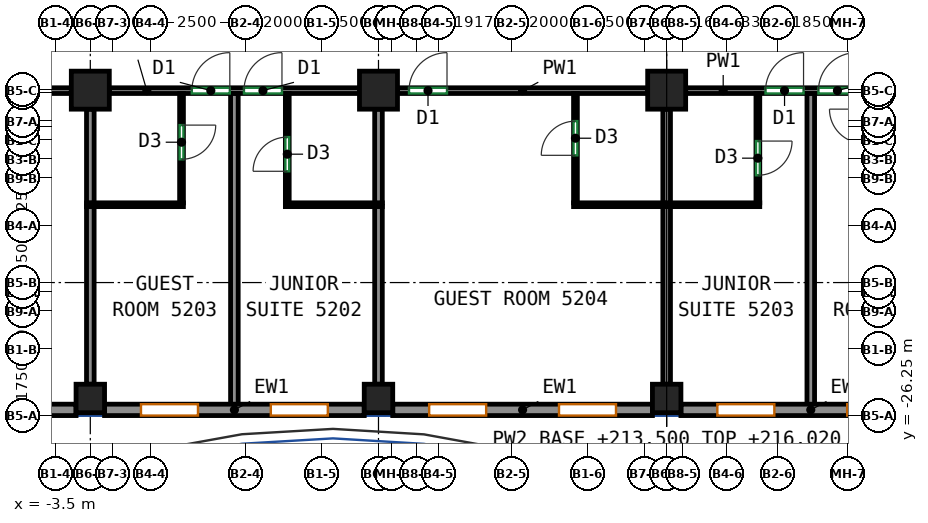
"""IFC4 building model, lengths in metres.
Left out: names, types, materials, properties, quantities, classifications, styles, units other than length and angle.
Written with IfcOpenShell. Run it as: python <this file> out.ifc"""

import sys

from ifc_helpers import new_model, si_unit, direction, frame, frame_2d, origin, origin_2d, place, context, subcontext, project, spatial, rectangle, extrude, source, transform, mapped, element, fill, save


model = new_model("IFC4")
c1 = context("Model", 3, precision=1e-05, world=origin(), true_north=direction((0.0, 1.0)))
c2 = subcontext(c1, "Body", "Model", "MODEL_VIEW")
j1 = project(units=[si_unit("LENGTHUNIT", "METRE"), si_unit("PLANEANGLEUNIT", "RADIAN")], contexts=[c1])
p1 = place(None, origin())
s1 = spatial("IfcSite", under=j1, at=p1, CompositionType="ELEMENT")
p2 = place(p1, origin())
s2 = spatial("IfcBuilding", under=s1, at=p2, CompositionType="ELEMENT")
p3 = place(p2, frame((0.0, 0.0, 213.5)))
s3 = spatial("IfcBuildingStorey", under=s2, at=p3, CompositionType="ELEMENT", Elevation=213.5)
m1 = source(origin(), c2, "Body", "SweptSolid", [
    extrude(rectangle(XDim=0.75, YDim=0.75, at=origin_2d()), origin(), (0.0, 0.0, 1.0), 3.12),
])
p4 = place(p3, frame((-2.583, -25.8, 0.0), z_axis=(0.0, 0.0, 1.0), x_axis=(1.0, 0.0, 0.0)))
e1 = element("IfcColumn", 1, at=p4, inside=s3, PredefinedType="COLUMN", context=c2, shape_type="MappedRepresentation", body=[
    mapped(m1, transform((0.0, 0.0, 0.0))),
])
m2 = source(origin(), c2, "Body", "SweptSolid", [
    extrude(rectangle(XDim=1.0, YDim=1.0, at=origin_2d()), origin(), (0.0, 0.0, 1.0), 3.12),
])
p5 = place(p3, frame((-2.583, -17.688, 0.0), z_axis=(0.0, 0.0, 1.0), x_axis=(1.0, 0.0, 0.0)))
e2 = element("IfcColumn", 2, at=p5, inside=s3, PredefinedType="COLUMN", context=c2, shape_type="MappedRepresentation", body=[
    mapped(m2, transform((0.0, 0.0, 0.0))),
])
p6 = place(p3, frame((5.0, -25.8, 0.0), z_axis=(0.0, 0.0, 1.0), x_axis=(1.0, 0.0, 0.0)))
e3 = element("IfcColumn", 3, at=p6, inside=s3, PredefinedType="COLUMN", context=c2, shape_type="MappedRepresentation", body=[
    mapped(m1, transform((0.0, 0.0, 0.0))),
])
p7 = place(p3, frame((5.0, -17.688, 0.0), z_axis=(0.0, 0.0, 1.0), x_axis=(1.0, 0.0, 0.0)))
e4 = element("IfcColumn", 4, at=p7, inside=s3, PredefinedType="COLUMN", context=c2, shape_type="MappedRepresentation", body=[
    mapped(m2, transform((0.0, 0.0, 0.0))),
])
p8 = place(p3, frame((12.583, -25.8, 0.0), z_axis=(0.0, 0.0, 1.0), x_axis=(1.0, 0.0, 0.0)))
e5 = element("IfcColumn", 5, at=p8, inside=s3, PredefinedType="COLUMN", context=c2, shape_type="MappedRepresentation", body=[
    mapped(m1, transform((0.0, 0.0, 0.0))),
])
p9 = place(p3, frame((12.583, -17.688, 0.0), z_axis=(0.0, 0.0, 1.0), x_axis=(1.0, 0.0, 0.0)))
e6 = element("IfcColumn", 6, at=p9, inside=s3, PredefinedType="COLUMN", context=c2, shape_type="MappedRepresentation", body=[
    mapped(m2, transform((0.0, 0.0, 0.0))),
])
m3 = source(origin(), c2, "Body", "SweptSolid", [
    extrude(rectangle(XDim=6.833, YDim=0.3, at=frame_2d((3.417, 0.0))), origin(), (0.0, 0.0, 1.0), 3.12),
])
p10 = place(p3, frame((-9.792, -26.1, 0.0), z_axis=(0.0, 0.0, 1.0), x_axis=(1.0, 0.0, 0.0)))
e7 = element("IfcWall", 7, at=p10, inside=s3, PredefinedType="SOLIDWALL", context=c2, shape_type="MappedRepresentation", body=[
    mapped(m3, transform((0.0, 0.0, 0.0))),
])
p11 = place(p10, frame((0.958, 0.0, 0.85)))
e8 = element("IfcOpeningElement", 8, at=p11, cuts=e7, PredefinedType="OPENING", context=c2, shape_type="SweptSolid", body=[
    extrude(rectangle(XDim=1.5, YDim=1.95, at=frame_2d((0.75, 0.975))), frame((0.0, 0.16, 0.0), z_axis=(0.0, -1.0, 0.0), x_axis=(1.0, 0.0, 0.0)), (0.0, 0.0, 1.0), 0.32),
])
p12 = place(p10, frame((4.375, 0.0, 0.85)))
e9 = element("IfcOpeningElement", 9, at=p12, cuts=e7, PredefinedType="OPENING", context=c2, shape_type="SweptSolid", body=[
    extrude(rectangle(XDim=1.5, YDim=1.95, at=frame_2d((0.75, 0.975))), frame((0.0, 0.16, 0.0), z_axis=(0.0, -1.0, 0.0), x_axis=(1.0, 0.0, 0.0)), (0.0, 0.0, 1.0), 0.32),
])
m4 = source(origin(), c2, "Body", "SweptSolid", [
    extrude(rectangle(XDim=6.833, YDim=0.3, at=frame_2d((3.417, 0.0))), origin(), (0.0, 0.0, 1.0), 3.12),
])
p13 = place(p3, frame((-2.208, -26.1, 0.0), z_axis=(0.0, 0.0, 1.0), x_axis=(1.0, 0.0, 0.0)))
e10 = element("IfcWall", 10, at=p13, inside=s3, PredefinedType="SOLIDWALL", context=c2, shape_type="MappedRepresentation", body=[
    mapped(m4, transform((0.0, 0.0, 0.0))),
])
p14 = place(p13, frame((0.958, 0.0, 0.85)))
e11 = element("IfcOpeningElement", 11, at=p14, cuts=e10, PredefinedType="OPENING", context=c2, shape_type="SweptSolid", body=[
    extrude(rectangle(XDim=1.5, YDim=1.95, at=frame_2d((0.75, 0.975))), frame((0.0, 0.16, 0.0), z_axis=(0.0, -1.0, 0.0), x_axis=(1.0, 0.0, 0.0)), (0.0, 0.0, 1.0), 0.32),
])
p15 = place(p13, frame((4.375, 0.0, 0.85)))
e12 = element("IfcOpeningElement", 12, at=p15, cuts=e10, PredefinedType="OPENING", context=c2, shape_type="SweptSolid", body=[
    extrude(rectangle(XDim=1.5, YDim=1.95, at=frame_2d((0.75, 0.975))), frame((0.0, 0.16, 0.0), z_axis=(0.0, -1.0, 0.0), x_axis=(1.0, 0.0, 0.0)), (0.0, 0.0, 1.0), 0.32),
])
p16 = place(p3, frame((5.375, -26.1, 0.0), z_axis=(0.0, 0.0, 1.0), x_axis=(1.0, 0.0, 0.0)))
e13 = element("IfcWall", 13, at=p16, inside=s3, PredefinedType="SOLIDWALL", context=c2, shape_type="MappedRepresentation", body=[
    mapped(m4, transform((0.0, 0.0, 0.0))),
])
p17 = place(p16, frame((0.958, 0.0, 0.85)))
e14 = element("IfcOpeningElement", 14, at=p17, cuts=e13, PredefinedType="OPENING", context=c2, shape_type="SweptSolid", body=[
    extrude(rectangle(XDim=1.5, YDim=1.95, at=frame_2d((0.75, 0.975))), frame((0.0, 0.16, 0.0), z_axis=(0.0, -1.0, 0.0), x_axis=(1.0, 0.0, 0.0)), (0.0, 0.0, 1.0), 0.32),
])
p18 = place(p16, frame((4.375, 0.0, 0.85)))
e15 = element("IfcOpeningElement", 15, at=p18, cuts=e13, PredefinedType="OPENING", context=c2, shape_type="SweptSolid", body=[
    extrude(rectangle(XDim=1.5, YDim=1.95, at=frame_2d((0.75, 0.975))), frame((0.0, 0.16, 0.0), z_axis=(0.0, -1.0, 0.0), x_axis=(1.0, 0.0, 0.0)), (0.0, 0.0, 1.0), 0.32),
])
p19 = place(p3, frame((12.958, -26.1, 0.0), z_axis=(0.0, 0.0, 1.0), x_axis=(1.0, 0.0, 0.0)))
e16 = element("IfcWall", 16, at=p19, inside=s3, PredefinedType="SOLIDWALL", context=c2, shape_type="MappedRepresentation", body=[
    mapped(m3, transform((0.0, 0.0, 0.0))),
])
p20 = place(p19, frame((0.958, 0.0, 0.85)))
e17 = element("IfcOpeningElement", 17, at=p20, cuts=e16, PredefinedType="OPENING", context=c2, shape_type="SweptSolid", body=[
    extrude(rectangle(XDim=1.5, YDim=1.95, at=frame_2d((0.75, 0.975))), frame((0.0, 0.16, 0.0), z_axis=(0.0, -1.0, 0.0), x_axis=(1.0, 0.0, 0.0)), (0.0, 0.0, 1.0), 0.32),
])
p21 = place(p19, frame((4.375, 0.0, 0.85)))
e18 = element("IfcOpeningElement", 18, at=p21, cuts=e16, PredefinedType="OPENING", context=c2, shape_type="SweptSolid", body=[
    extrude(rectangle(XDim=1.5, YDim=1.95, at=frame_2d((0.75, 0.975))), frame((0.0, 0.16, 0.0), z_axis=(0.0, -1.0, 0.0), x_axis=(1.0, 0.0, 0.0)), (0.0, 0.0, 1.0), 0.32),
])
p22 = place(p3, frame((-9.667, -17.7, 0.0), z_axis=(0.0, 0.0, 1.0), x_axis=(1.0, 0.0, 0.0)))
e19 = element("IfcWall", 19, at=p22, inside=s3, PredefinedType="PARTITIONING", context=c2, shape_type="SweptSolid", body=[
    extrude(rectangle(XDim=6.584, YDim=0.15, at=frame_2d((3.292, 0.0))), origin(), (0.0, 0.0, 1.0), 3.12),
])
p23 = place(p22, frame((3.119, 0.0, 0.0)))
e20 = element("IfcOpeningElement", 20, at=p23, cuts=e19, PredefinedType="OPENING", context=c2, shape_type="SweptSolid", body=[
    extrude(rectangle(XDim=1.0, YDim=2.1, at=frame_2d((0.5, 1.05))), frame((0.0, 0.085, 0.0), z_axis=(0.0, -1.0, 0.0), x_axis=(1.0, 0.0, 0.0)), (0.0, 0.0, 1.0), 0.17),
])
p24 = place(p3, frame((-2.083, -17.7, 0.0), z_axis=(0.0, 0.0, 1.0), x_axis=(1.0, 0.0, 0.0)))
e21 = element("IfcWall", 21, at=p24, inside=s3, PredefinedType="PARTITIONING", context=c2, shape_type="SweptSolid", body=[
    extrude(rectangle(XDim=6.583, YDim=0.15, at=frame_2d((3.292, 0.0))), origin(), (0.0, 0.0, 1.0), 3.12),
])
p25 = place(p24, frame((2.171, 0.0, 0.0)))
e22 = element("IfcOpeningElement", 22, at=p25, cuts=e21, PredefinedType="OPENING", context=c2, shape_type="SweptSolid", body=[
    extrude(rectangle(XDim=1.0, YDim=2.1, at=frame_2d((0.5, 1.05))), frame((0.0, 0.085, 0.0), z_axis=(0.0, -1.0, 0.0), x_axis=(1.0, 0.0, 0.0)), (0.0, 0.0, 1.0), 0.17),
])
p26 = place(p24, frame((3.543, 0.0, 0.0)))
e23 = element("IfcOpeningElement", 23, at=p26, cuts=e21, PredefinedType="OPENING", context=c2, shape_type="SweptSolid", body=[
    extrude(rectangle(XDim=1.0, YDim=2.1, at=frame_2d((0.5, 1.05))), frame((0.0, 0.085, 0.0), z_axis=(0.0, -1.0, 0.0), x_axis=(1.0, 0.0, 0.0)), (0.0, 0.0, 1.0), 0.17),
])
p27 = place(p3, frame((5.5, -17.7, 0.0), z_axis=(0.0, 0.0, 1.0), x_axis=(1.0, 0.0, 0.0)))
e24 = element("IfcWall", 24, at=p27, inside=s3, PredefinedType="PARTITIONING", context=c2, shape_type="SweptSolid", body=[
    extrude(rectangle(XDim=6.583, YDim=0.15, at=frame_2d((3.292, 0.0))), origin(), (0.0, 0.0, 1.0), 3.12),
])
p28 = place(p27, frame((0.303, 0.0, 0.0)))
e25 = element("IfcOpeningElement", 25, at=p28, cuts=e24, PredefinedType="OPENING", context=c2, shape_type="SweptSolid", body=[
    extrude(rectangle(XDim=1.0, YDim=2.1, at=frame_2d((0.5, 1.05))), frame((0.0, 0.085, 0.0), z_axis=(0.0, -1.0, 0.0), x_axis=(1.0, 0.0, 0.0)), (0.0, 0.0, 1.0), 0.17),
])
p29 = place(p3, frame((13.083, -17.7, 0.0), z_axis=(0.0, 0.0, 1.0), x_axis=(1.0, 0.0, 0.0)))
e26 = element("IfcWall", 26, at=p29, inside=s3, PredefinedType="PARTITIONING", context=c2, shape_type="SweptSolid", body=[
    extrude(rectangle(XDim=6.584, YDim=0.15, at=frame_2d((3.292, 0.0))), origin(), (0.0, 0.0, 1.0), 3.12),
])
p30 = place(p29, frame((2.102, 0.0, 0.0)))
e27 = element("IfcOpeningElement", 27, at=p30, cuts=e26, PredefinedType="OPENING", context=c2, shape_type="SweptSolid", body=[
    extrude(rectangle(XDim=1.0, YDim=2.1, at=frame_2d((0.5, 1.05))), frame((0.0, 0.085, 0.0), z_axis=(0.0, -1.0, 0.0), x_axis=(1.0, 0.0, 0.0)), (0.0, 0.0, 1.0), 0.17),
])
p31 = place(p29, frame((3.494, 0.0, 0.0)))
e28 = element("IfcOpeningElement", 28, at=p31, cuts=e26, PredefinedType="OPENING", context=c2, shape_type="SweptSolid", body=[
    extrude(rectangle(XDim=1.0, YDim=2.1, at=frame_2d((0.5, 1.05))), frame((0.0, 0.085, 0.0), z_axis=(0.0, -1.0, 0.0), x_axis=(1.0, 0.0, 0.0)), (0.0, 0.0, 1.0), 0.17),
])
p32 = place(p3, frame((-2.583, -25.425, 0.0), z_axis=(0.0, 0.0, 1.0), x_axis=(0.0, 1.0, 0.0)))
e29 = element("IfcWall", 29, at=p32, inside=s3, PredefinedType="PARTITIONING", context=c2, shape_type="SweptSolid", body=[
    extrude(rectangle(XDim=4.683, YDim=0.2, at=frame_2d((2.342, 0.0))), origin(), (0.0, 0.0, 1.0), 3.12),
])
p33 = place(p3, frame((-2.583, -20.662, 0.0), z_axis=(0.0, 0.0, 1.0), x_axis=(0.0, 1.0, 0.0)))
e30 = element("IfcWall", 30, at=p33, inside=s3, PredefinedType="PARTITIONING", context=c2, shape_type="SweptSolid", body=[
    extrude(rectangle(XDim=2.474, YDim=0.2, at=frame_2d((1.237, 0.0))), origin(), (0.0, 0.0, 1.0), 3.12),
])
p34 = place(p3, frame((-0.183, -17.777, 0.0), z_axis=(0.0, 0.0, 1.0), x_axis=(0.0, -1.0, 0.0)))
e31 = element("IfcWall", 31, at=p34, inside=s3, PredefinedType="PARTITIONING", context=c2, shape_type="SweptSolid", body=[
    extrude(rectangle(XDim=2.875, YDim=0.1, at=frame_2d((1.438, 0.0))), origin(), (0.0, 0.0, 1.0), 3.12),
])
p35 = place(p34, frame((0.83, 0.0, 0.0)))
e32 = element("IfcOpeningElement", 32, at=p35, cuts=e31, PredefinedType="OPENING", context=c2, shape_type="SweptSolid", body=[
    extrude(rectangle(XDim=0.9, YDim=2.1, at=frame_2d((0.45, 1.05))), frame((0.0, 0.06, 0.0), z_axis=(0.0, -1.0, 0.0), x_axis=(1.0, 0.0, 0.0)), (0.0, 0.0, 1.0), 0.12),
])
p36 = place(p3, frame((-2.683, -20.702, 0.0), z_axis=(0.0, 0.0, 1.0), x_axis=(1.0, 0.0, 0.0)))
e33 = element("IfcWall", 33, at=p36, inside=s3, PredefinedType="PARTITIONING", context=c2, shape_type="SweptSolid", body=[
    extrude(rectangle(XDim=2.55, YDim=0.1, at=frame_2d((1.275, 0.0))), origin(), (0.0, 0.0, 1.0), 3.12),
])
p37 = place(p3, frame((1.208, -26.0, 0.0), z_axis=(0.0, 0.0, 1.0), x_axis=(0.0, 1.0, 0.0)))
e34 = element("IfcWall", 34, at=p37, inside=s3, PredefinedType="PARTITIONING", context=c2, shape_type="SweptSolid", body=[
    extrude(rectangle(XDim=8.223, YDim=0.2, at=frame_2d((4.111, 0.0))), origin(), (0.0, 0.0, 1.0), 3.12),
])
p38 = place(p3, frame((2.6, -20.652, 0.0), z_axis=(0.0, 0.0, 1.0), x_axis=(0.0, 1.0, 0.0)))
e35 = element("IfcWall", 35, at=p38, inside=s3, PredefinedType="PARTITIONING", context=c2, shape_type="SweptSolid", body=[
    extrude(rectangle(XDim=2.875, YDim=0.1, at=frame_2d((1.438, 0.0))), origin(), (0.0, 0.0, 1.0), 3.12),
])
p39 = place(p38, frame((0.83, 0.0, 0.0)))
e36 = element("IfcOpeningElement", 36, at=p39, cuts=e35, PredefinedType="OPENING", context=c2, shape_type="SweptSolid", body=[
    extrude(rectangle(XDim=0.9, YDim=2.1, at=frame_2d((0.45, 1.05))), frame((0.0, 0.06, 0.0), z_axis=(0.0, -1.0, 0.0), x_axis=(1.0, 0.0, 0.0)), (0.0, 0.0, 1.0), 0.12),
])
p40 = place(p3, frame((2.55, -20.702, 0.0), z_axis=(0.0, 0.0, 1.0), x_axis=(1.0, 0.0, 0.0)))
e37 = element("IfcWall", 37, at=p40, inside=s3, PredefinedType="PARTITIONING", context=c2, shape_type="SweptSolid", body=[
    extrude(rectangle(XDim=2.55, YDim=0.1, at=frame_2d((1.275, 0.0))), origin(), (0.0, 0.0, 1.0), 3.12),
])
p41 = place(p3, frame((5.0, -25.425, 0.0), z_axis=(0.0, 0.0, 1.0), x_axis=(0.0, 1.0, 0.0)))
e38 = element("IfcWall", 38, at=p41, inside=s3, PredefinedType="PARTITIONING", context=c2, shape_type="SweptSolid", body=[
    extrude(rectangle(XDim=4.673, YDim=0.2, at=frame_2d((2.336, 0.0))), origin(), (0.0, 0.0, 1.0), 3.12),
])
p42 = place(p3, frame((5.0, -20.652, 0.0), z_axis=(0.0, 0.0, 1.0), x_axis=(0.0, 1.0, 0.0)))
e39 = element("IfcWall", 39, at=p42, inside=s3, PredefinedType="PARTITIONING", context=c2, shape_type="SweptSolid", body=[
    extrude(rectangle(XDim=2.464, YDim=0.2, at=frame_2d((1.232, 0.0))), origin(), (0.0, 0.0, 1.0), 3.12),
])
p43 = place(p3, frame((10.183, -20.652, 0.0), z_axis=(0.0, 0.0, 1.0), x_axis=(0.0, 1.0, 0.0)))
e40 = element("IfcWall", 40, at=p43, inside=s3, PredefinedType="PARTITIONING", context=c2, shape_type="SweptSolid", body=[
    extrude(rectangle(XDim=2.875, YDim=0.1, at=frame_2d((1.438, 0.0))), origin(), (0.0, 0.0, 1.0), 3.12),
])
p44 = place(p43, frame((1.25, 0.0, 0.0)))
e41 = element("IfcOpeningElement", 41, at=p44, cuts=e40, PredefinedType="OPENING", context=c2, shape_type="SweptSolid", body=[
    extrude(rectangle(XDim=0.9, YDim=2.1, at=frame_2d((0.45, 1.05))), frame((0.0, 0.06, 0.0), z_axis=(0.0, -1.0, 0.0), x_axis=(1.0, 0.0, 0.0)), (0.0, 0.0, 1.0), 0.12),
])
p45 = place(p3, frame((10.133, -20.702, 0.0), z_axis=(0.0, 0.0, 1.0), x_axis=(1.0, 0.0, 0.0)))
e42 = element("IfcWall", 42, at=p45, inside=s3, PredefinedType="PARTITIONING", context=c2, shape_type="SweptSolid", body=[
    extrude(rectangle(XDim=4.9, YDim=0.1, at=frame_2d((2.45, 0.0))), origin(), (0.0, 0.0, 1.0), 3.12),
])
p46 = place(p3, frame((12.583, -25.425, 0.0), z_axis=(0.0, 0.0, 1.0), x_axis=(0.0, 1.0, 0.0)))
e43 = element("IfcWall", 43, at=p46, inside=s3, PredefinedType="PARTITIONING", context=c2, shape_type="SweptSolid", body=[
    extrude(rectangle(XDim=4.673, YDim=0.2, at=frame_2d((2.336, 0.0))), origin(), (0.0, 0.0, 1.0), 3.12),
])
p47 = place(p3, frame((12.583, -20.652, 0.0), z_axis=(0.0, 0.0, 1.0), x_axis=(0.0, 1.0, 0.0)))
e44 = element("IfcWall", 44, at=p47, inside=s3, PredefinedType="PARTITIONING", context=c2, shape_type="SweptSolid", body=[
    extrude(rectangle(XDim=2.464, YDim=0.2, at=frame_2d((1.232, 0.0))), origin(), (0.0, 0.0, 1.0), 3.12),
])
p48 = place(p3, frame((14.983, -17.777, 0.0), z_axis=(0.0, 0.0, 1.0), x_axis=(0.0, -1.0, 0.0)))
e45 = element("IfcWall", 45, at=p48, inside=s3, PredefinedType="PARTITIONING", context=c2, shape_type="SweptSolid", body=[
    extrude(rectangle(XDim=2.875, YDim=0.1, at=frame_2d((1.438, 0.0))), origin(), (0.0, 0.0, 1.0), 3.12),
])
p49 = place(p48, frame((1.25, 0.0, 0.0)))
e46 = element("IfcOpeningElement", 46, at=p49, cuts=e45, PredefinedType="OPENING", context=c2, shape_type="SweptSolid", body=[
    extrude(rectangle(XDim=0.9, YDim=2.1, at=frame_2d((0.45, 1.05))), frame((0.0, 0.06, 0.0), z_axis=(0.0, -1.0, 0.0), x_axis=(1.0, 0.0, 0.0)), (0.0, 0.0, 1.0), 0.12),
])
p50 = place(p3, frame((16.375, -26.0, 0.0), z_axis=(0.0, 0.0, 1.0), x_axis=(0.0, 1.0, 0.0)))
e47 = element("IfcWall", 47, at=p50, inside=s3, PredefinedType="PARTITIONING", context=c2, shape_type="SweptSolid", body=[
    extrude(rectangle(XDim=8.223, YDim=0.2, at=frame_2d((4.111, 0.0))), origin(), (0.0, 0.0, 1.0), 3.12),
])
p51 = place(p14, origin())
e48 = element("IfcWindow", 48, at=p51, inside=s3, PartitioningType="SINGLE_PANEL", PredefinedType="WINDOW", context=c2, shape_type="SweptSolid", body=[
    extrude(rectangle(XDim=1.5, YDim=1.95, at=frame_2d((0.75, 0.975))), frame((0.0, 0.03, 0.0), z_axis=(0.0, -1.0, 0.0), x_axis=(1.0, 0.0, 0.0)), (0.0, 0.0, 1.0), 0.06),
])
fill(e11, e48)
p52 = place(p15, origin())
e49 = element("IfcWindow", 49, at=p52, inside=s3, PartitioningType="SINGLE_PANEL", PredefinedType="WINDOW", context=c2, shape_type="SweptSolid", body=[
    extrude(rectangle(XDim=1.5, YDim=1.95, at=frame_2d((0.75, 0.975))), frame((0.0, 0.03, 0.0), z_axis=(0.0, -1.0, 0.0), x_axis=(1.0, 0.0, 0.0)), (0.0, 0.0, 1.0), 0.06),
])
fill(e12, e49)
p53 = place(p17, origin())
e50 = element("IfcWindow", 50, at=p53, inside=s3, PartitioningType="SINGLE_PANEL", PredefinedType="WINDOW", context=c2, shape_type="SweptSolid", body=[
    extrude(rectangle(XDim=1.5, YDim=1.95, at=frame_2d((0.75, 0.975))), frame((0.0, 0.03, 0.0), z_axis=(0.0, -1.0, 0.0), x_axis=(1.0, 0.0, 0.0)), (0.0, 0.0, 1.0), 0.06),
])
fill(e14, e50)
p54 = place(p18, origin())
e51 = element("IfcWindow", 51, at=p54, inside=s3, PartitioningType="SINGLE_PANEL", PredefinedType="WINDOW", context=c2, shape_type="SweptSolid", body=[
    extrude(rectangle(XDim=1.5, YDim=1.95, at=frame_2d((0.75, 0.975))), frame((0.0, 0.03, 0.0), z_axis=(0.0, -1.0, 0.0), x_axis=(1.0, 0.0, 0.0)), (0.0, 0.0, 1.0), 0.06),
])
fill(e15, e51)
p55 = place(p20, origin())
e52 = element("IfcWindow", 52, at=p55, inside=s3, PartitioningType="SINGLE_PANEL", PredefinedType="WINDOW", context=c2, shape_type="SweptSolid", body=[
    extrude(rectangle(XDim=1.5, YDim=1.95, at=frame_2d((0.75, 0.975))), frame((0.0, 0.03, 0.0), z_axis=(0.0, -1.0, 0.0), x_axis=(1.0, 0.0, 0.0)), (0.0, 0.0, 1.0), 0.06),
])
fill(e17, e52)
p56 = place(p21, origin())
e53 = element("IfcWindow", 53, at=p56, inside=s3, PartitioningType="SINGLE_PANEL", PredefinedType="WINDOW", context=c2, shape_type="SweptSolid", body=[
    extrude(rectangle(XDim=1.5, YDim=1.95, at=frame_2d((0.75, 0.975))), frame((0.0, 0.03, 0.0), z_axis=(0.0, -1.0, 0.0), x_axis=(1.0, 0.0, 0.0)), (0.0, 0.0, 1.0), 0.06),
])
fill(e18, e53)
p57 = place(p49, origin())
e54 = element("IfcDoor", 54, at=p57, inside=s3, OperationType="SINGLE_SWING_LEFT", PredefinedType="DOOR", context=c2, shape_type="SweptSolid", body=[
    extrude(rectangle(XDim=0.9, YDim=2.1, at=frame_2d((0.45, 1.05))), frame((0.0, 0.025, 0.0), z_axis=(0.0, -1.0, 0.0), x_axis=(1.0, 0.0, 0.0)), (0.0, 0.0, 1.0), 0.05),
])
fill(e46, e54)
p58 = place(p39, origin())
e55 = element("IfcDoor", 55, at=p58, inside=s3, OperationType="SINGLE_SWING_LEFT", PredefinedType="DOOR", context=c2, shape_type="SweptSolid", body=[
    extrude(rectangle(XDim=0.9, YDim=2.1, at=frame_2d((0.45, 1.05))), frame((0.0, 0.025, 0.0), z_axis=(0.0, -1.0, 0.0), x_axis=(1.0, 0.0, 0.0)), (0.0, 0.0, 1.0), 0.05),
])
fill(e36, e55)
p59 = place(p35, origin())
e56 = element("IfcDoor", 56, at=p59, inside=s3, OperationType="SINGLE_SWING_LEFT", PredefinedType="DOOR", context=c2, shape_type="SweptSolid", body=[
    extrude(rectangle(XDim=0.9, YDim=2.1, at=frame_2d((0.45, 1.05))), frame((0.0, 0.025, 0.0), z_axis=(0.0, -1.0, 0.0), x_axis=(1.0, 0.0, 0.0)), (0.0, 0.0, 1.0), 0.05),
])
fill(e32, e56)
p60 = place(p44, origin())
e57 = element("IfcDoor", 57, at=p60, inside=s3, OperationType="SINGLE_SWING_LEFT", PredefinedType="DOOR", context=c2, shape_type="SweptSolid", body=[
    extrude(rectangle(XDim=0.9, YDim=2.1, at=frame_2d((0.45, 1.05))), frame((0.0, 0.025, 0.0), z_axis=(0.0, -1.0, 0.0), x_axis=(1.0, 0.0, 0.0)), (0.0, 0.0, 1.0), 0.05),
])
fill(e41, e57)
p61 = place(p25, origin())
e58 = element("IfcDoor", 58, at=p61, inside=s3, OperationType="SINGLE_SWING_RIGHT", PredefinedType="DOOR", context=c2, shape_type="SweptSolid", body=[
    extrude(rectangle(XDim=1.0, YDim=2.1, at=frame_2d((0.5, 1.05))), frame((0.0, 0.025, 0.0), z_axis=(0.0, -1.0, 0.0), x_axis=(1.0, 0.0, 0.0)), (0.0, 0.0, 1.0), 0.05),
])
fill(e22, e58)
p62 = place(p26, origin())
e59 = element("IfcDoor", 59, at=p62, inside=s3, OperationType="SINGLE_SWING_RIGHT", PredefinedType="DOOR", context=c2, shape_type="SweptSolid", body=[
    extrude(rectangle(XDim=1.0, YDim=2.1, at=frame_2d((0.5, 1.05))), frame((0.0, 0.025, 0.0), z_axis=(0.0, -1.0, 0.0), x_axis=(1.0, 0.0, 0.0)), (0.0, 0.0, 1.0), 0.05),
])
fill(e23, e59)
p63 = place(p28, origin())
e60 = element("IfcDoor", 60, at=p63, inside=s3, OperationType="SINGLE_SWING_RIGHT", PredefinedType="DOOR", context=c2, shape_type="SweptSolid", body=[
    extrude(rectangle(XDim=1.0, YDim=2.1, at=frame_2d((0.5, 1.05))), frame((0.0, 0.025, 0.0), z_axis=(0.0, -1.0, 0.0), x_axis=(1.0, 0.0, 0.0)), (0.0, 0.0, 1.0), 0.05),
])
fill(e25, e60)
p64 = place(p30, origin())
e61 = element("IfcDoor", 61, at=p64, inside=s3, OperationType="SINGLE_SWING_RIGHT", PredefinedType="DOOR", context=c2, shape_type="SweptSolid", body=[
    extrude(rectangle(XDim=1.0, YDim=2.1, at=frame_2d((0.5, 1.05))), frame((0.0, 0.025, 0.0), z_axis=(0.0, -1.0, 0.0), x_axis=(1.0, 0.0, 0.0)), (0.0, 0.0, 1.0), 0.05),
])
fill(e27, e61)
p65 = place(p31, origin())
e62 = element("IfcDoor", 62, at=p65, inside=s3, OperationType="SINGLE_SWING_RIGHT", PredefinedType="DOOR", context=c2, shape_type="SweptSolid", body=[
    extrude(rectangle(XDim=1.0, YDim=2.1, at=frame_2d((0.5, 1.05))), frame((0.0, 0.025, 0.0), z_axis=(0.0, -1.0, 0.0), x_axis=(1.0, 0.0, 0.0)), (0.0, 0.0, 1.0), 0.05),
])
fill(e28, e62)
save(model, sys.argv[1])
